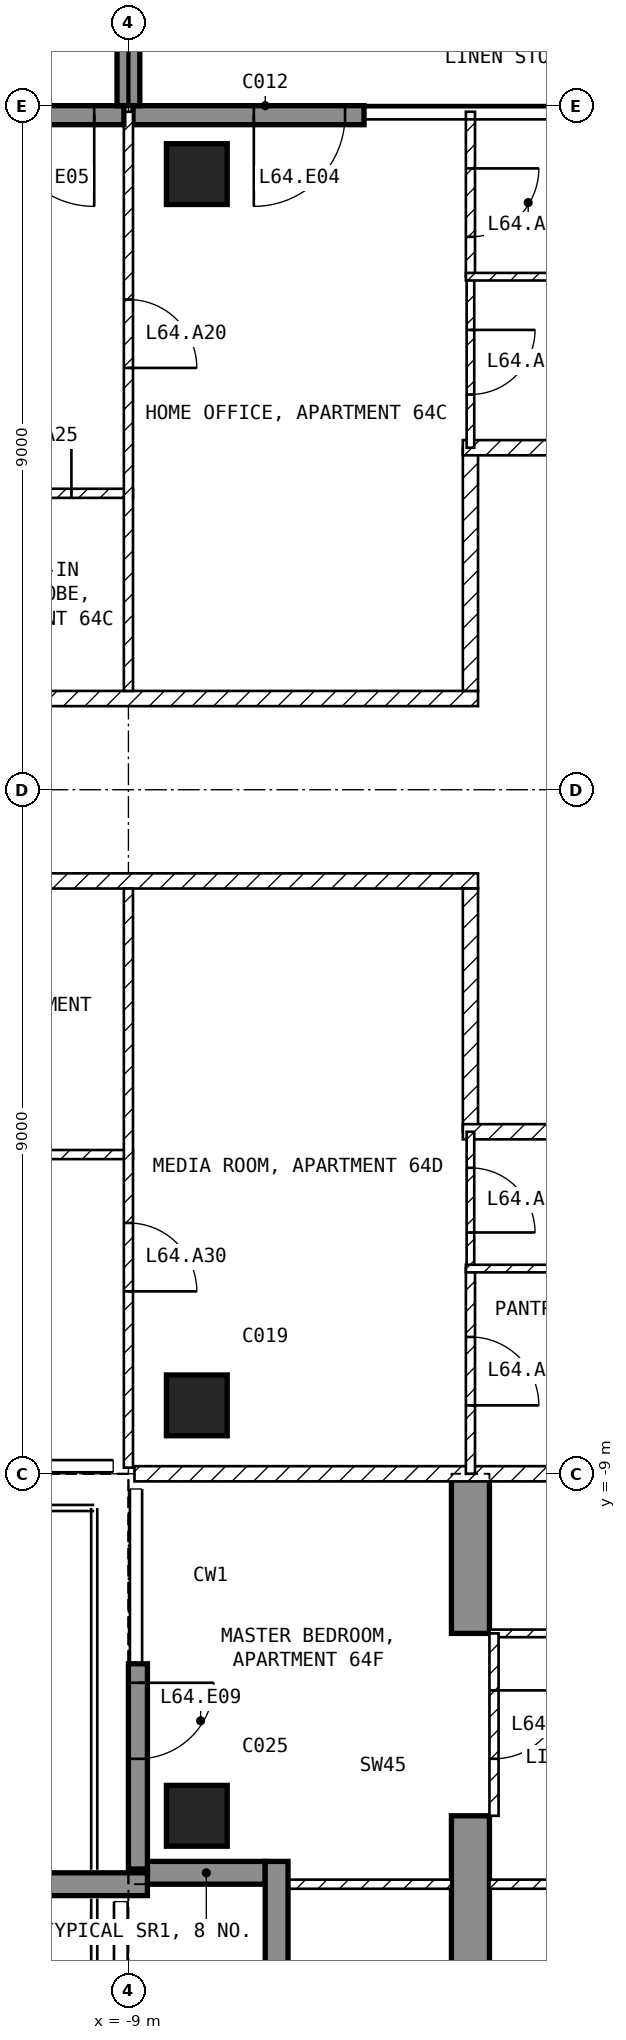
"""IFC4 building model, lengths in metres.
Left out: names, types, materials, properties, quantities, classifications, styles, units other than length and angle.
Written with IfcOpenShell. Run it as: python <this file> out.ifc"""

import sys

from ifc_helpers import new_model, si_unit, direction, frame, frame_2d, origin, origin_2d, place, context, subcontext, project, spatial, polyline, rectangle, outline, extrude, element, fill, save


model = new_model("IFC4")
c1 = context("Model", 3, precision=1e-05, world=origin(), true_north=direction((0.0, 1.0)))
c2 = subcontext(c1, "Body", "Model", "MODEL_VIEW")
j1 = project(units=[si_unit("LENGTHUNIT", "METRE"), si_unit("PLANEANGLEUNIT", "RADIAN")], contexts=[c1])
p1 = place(None, origin())
s1 = spatial("IfcSite", under=j1, at=p1, CompositionType="ELEMENT")
p2 = place(p1, origin())
s2 = spatial("IfcBuilding", under=s1, at=p2, CompositionType="ELEMENT")
p3 = place(p2, frame((0.0, 0.0, 253.5)))
s3 = spatial("IfcBuildingStorey", under=s2, at=p3, CompositionType="ELEMENT", Elevation=253.5)
for number, where, z_axis, x_axis in (
    (1, (-8.1, -13.5, -0.25), (0.0, 0.0, 1.0), (1.0, 0.0, 0.0)),
    (2, (-8.1, -8.1, -0.25), (0.0, 0.0, 1.0), (1.0, 0.0, 0.0)),
    (3, (-8.1, 8.1, -0.25), (0.0, 0.0, 1.0), (1.0, 0.0, 0.0)),
):
    element("IfcColumn", number, at=place(p3, frame(where, z_axis=z_axis, x_axis=x_axis)), inside=s3, PredefinedType="COLUMN", context=c2, shape_type="SweptSolid", body=[
        extrude(rectangle(XDim=0.8, YDim=0.8, at=origin_2d()), origin(), (0.0, 0.0, 1.0), 3.5),
    ])
p4 = place(p3, frame((-4.75, -16.7, -0.25), z_axis=(1.0, 0.0, 0.0), x_axis=(0.0, 1.0, 0.0)))
e4 = element("IfcWall", 4, at=p4, inside=s3, PredefinedType="SHEAR", context=c2, shape_type="SweptSolid", body=[
    extrude(outline(polyline([(0.0, 0.0), (3.2, 0.0), (3.2, 2.65), (5.6, 2.65), (5.6, 0.0), (7.7, 0.0), (7.7, 3.5), (0.0, 3.5), (0.0, 0.0)])), origin(), (0.0, 0.0, 1.0), 0.5),
])
p5 = place(p3, frame((-5.9, 8.875, 0.0), z_axis=(0.0, 0.0, 1.0), x_axis=(-1.0, 0.0, 0.0)))
e5 = element("IfcWall", 5, at=p5, inside=s3, PredefinedType="SOLIDWALL", context=c2, shape_type="SweptSolid", body=[
    extrude(rectangle(XDim=3.04, YDim=0.25, at=frame_2d((1.52, 0.0))), origin(), (0.0, 0.0, 1.0), 3.25),
])
p6 = place(p5, frame((0.25, 0.0, 0.0)))
e6 = element("IfcOpeningElement", 6, at=p6, cuts=e5, PredefinedType="OPENING", context=c2, shape_type="SweptSolid", body=[
    extrude(rectangle(XDim=1.2, YDim=2.4, at=frame_2d((0.6, 1.2))), frame((0.0, 0.135, 0.0), z_axis=(0.0, -1.0, 0.0), x_axis=(1.0, 0.0, 0.0)), (0.0, 0.0, 1.0), 0.27),
])
p7 = place(p3, frame((-9.06, 8.875, 0.0), z_axis=(0.0, 0.0, 1.0), x_axis=(-1.0, 0.0, 0.0)))
e7 = element("IfcWall", 7, at=p7, inside=s3, PredefinedType="SOLIDWALL", context=c2, shape_type="SweptSolid", body=[
    extrude(rectangle(XDim=1.84, YDim=0.25, at=frame_2d((0.92, 0.0))), origin(), (0.0, 0.0, 1.0), 3.25),
])
p8 = place(p7, frame((0.39, 0.0, 0.0)))
e8 = element("IfcOpeningElement", 8, at=p8, cuts=e7, PredefinedType="OPENING", context=c2, shape_type="SweptSolid", body=[
    extrude(rectangle(XDim=1.2, YDim=2.4, at=frame_2d((0.6, 1.2))), frame((0.0, 0.135, 0.0), z_axis=(0.0, -1.0, 0.0), x_axis=(1.0, 0.0, 0.0)), (0.0, 0.0, 1.0), 0.27),
])
p9 = place(p3, frame((-8.875, -11.5, 0.0), z_axis=(0.0, 0.0, 1.0), x_axis=(0.0, -1.0, 0.0)))
e9 = element("IfcWall", 9, at=p9, inside=s3, PredefinedType="SOLIDWALL", context=c2, shape_type="SweptSolid", body=[
    extrude(rectangle(XDim=2.7, YDim=0.25, at=frame_2d((1.35, 0.0))), origin(), (0.0, 0.0, 1.0), 3.25),
])
p10 = place(p9, frame((0.25, 0.0, 0.0)))
e10 = element("IfcOpeningElement", 10, at=p10, cuts=e9, PredefinedType="OPENING", context=c2, shape_type="SweptSolid", body=[
    extrude(rectangle(XDim=1.0, YDim=2.4, at=frame_2d((0.5, 1.2))), frame((0.0, 0.135, 0.0), z_axis=(0.0, -1.0, 0.0), x_axis=(1.0, 0.0, 0.0)), (0.0, 0.0, 1.0), 0.27),
])
p11 = place(p3, frame((-8.75, -14.25, 0.0), z_axis=(0.0, 0.0, 1.0), x_axis=(1.0, 0.0, 0.0)))
e11 = element("IfcWall", 11, at=p11, inside=s3, PredefinedType="SOLIDWALL", context=c2, shape_type="SweptSolid", body=[
    extrude(rectangle(XDim=1.55, YDim=0.3, at=frame_2d((0.775, 0.0))), origin(), (0.0, 0.0, 1.0), 3.25),
])
p12 = place(p3, frame((-7.05, -14.1, 0.0), z_axis=(0.0, 0.0, 1.0), x_axis=(0.0, -1.0, 0.0)))
e12 = element("IfcWall", 12, at=p12, inside=s3, PredefinedType="SOLIDWALL", context=c2, shape_type="SweptSolid", body=[
    extrude(rectangle(XDim=1.8, YDim=0.3, at=frame_2d((0.9, 0.0))), origin(), (0.0, 0.0, 1.0), 3.25),
])
p13 = place(p3, frame((-8.75, -14.4, 0.0), z_axis=(0.0, 0.0, 1.0), x_axis=(-1.0, 0.0, 0.0)))
e13 = element("IfcWall", 13, at=p13, inside=s3, PredefinedType="SOLIDWALL", context=c2, shape_type="SweptSolid", body=[
    extrude(rectangle(XDim=2.95, YDim=0.3, at=frame_2d((1.475, 0.0))), origin(), (0.0, 0.0, 1.0), 3.25),
])
p14 = place(p3, frame((-9.0, 9.0, 0.0), z_axis=(0.0, 0.0, 1.0), x_axis=(0.0, 1.0, 0.0)))
e14 = element("IfcWall", 14, at=p14, inside=s3, PredefinedType="SOLIDWALL", context=c2, shape_type="SweptSolid", body=[
    extrude(rectangle(XDim=2.7, YDim=0.3, at=frame_2d((1.35, 0.0))), origin(), (0.0, 0.0, 1.0), 3.25),
])
p15 = place(p3, frame((-21.6, 1.2, 0.0), z_axis=(0.0, 0.0, 1.0), x_axis=(1.0, 0.0, 0.0)))
e15 = element("IfcWall", 15, at=p15, inside=s3, PredefinedType="PARTITIONING", context=c2, shape_type="SweptSolid", body=[
    extrude(rectangle(XDim=17.2, YDim=0.2, at=frame_2d((8.6, 0.0))), origin(), (0.0, 0.0, 1.0), 3.25),
])
p16 = place(p15, frame((6.1, 0.0, 0.0)))
e16 = element("IfcOpeningElement", 16, at=p16, cuts=e15, PredefinedType="OPENING", context=c2, shape_type="SweptSolid", body=[
    extrude(rectangle(XDim=1.0, YDim=2.1, at=frame_2d((0.5, 1.05))), frame((0.0, 0.11, 0.0), z_axis=(0.0, -1.0, 0.0), x_axis=(1.0, 0.0, 0.0)), (0.0, 0.0, 1.0), 0.22),
])
p17 = place(p3, frame((-4.5, 1.3, 0.0), z_axis=(0.0, 0.0, 1.0), x_axis=(0.0, 1.0, 0.0)))
e17 = element("IfcWall", 17, at=p17, inside=s3, PredefinedType="PARTITIONING", context=c2, shape_type="SweptSolid", body=[
    extrude(rectangle(XDim=3.2, YDim=0.2, at=frame_2d((1.6, 0.0))), origin(), (0.0, 0.0, 1.0), 3.25),
])
p18 = place(p3, frame((-4.6, 4.5, 0.0), z_axis=(0.0, 0.0, 1.0), x_axis=(1.0, 0.0, 0.0)))
e18 = element("IfcWall", 18, at=p18, inside=s3, PredefinedType="PARTITIONING", context=c2, shape_type="SweptSolid", body=[
    extrude(rectangle(XDim=3.5, YDim=0.2, at=frame_2d((1.75, 0.0))), origin(), (0.0, 0.0, 1.0), 3.25),
])
p19 = place(p3, frame((-4.4, -1.2, 0.0), z_axis=(0.0, 0.0, 1.0), x_axis=(-1.0, 0.0, 0.0)))
e19 = element("IfcWall", 19, at=p19, inside=s3, PredefinedType="PARTITIONING", context=c2, shape_type="SweptSolid", body=[
    extrude(rectangle(XDim=17.2, YDim=0.2, at=frame_2d((8.6, 0.0))), origin(), (0.0, 0.0, 1.0), 3.25),
])
p20 = place(p19, frame((12.05, 0.0, 0.0)))
e20 = element("IfcOpeningElement", 20, at=p20, cuts=e19, PredefinedType="OPENING", context=c2, shape_type="SweptSolid", body=[
    extrude(rectangle(XDim=1.0, YDim=2.1, at=frame_2d((0.5, 1.05))), frame((0.0, 0.11, 0.0), z_axis=(0.0, -1.0, 0.0), x_axis=(1.0, 0.0, 0.0)), (0.0, 0.0, 1.0), 0.22),
])
p21 = place(p3, frame((-4.5, -4.5, 0.0), z_axis=(0.0, 0.0, 1.0), x_axis=(0.0, 1.0, 0.0)))
e21 = element("IfcWall", 21, at=p21, inside=s3, PredefinedType="PARTITIONING", context=c2, shape_type="SweptSolid", body=[
    extrude(rectangle(XDim=3.2, YDim=0.2, at=frame_2d((1.6, 0.0))), origin(), (0.0, 0.0, 1.0), 3.25),
])
p22 = place(p3, frame((-1.1, -4.5, 0.0), z_axis=(0.0, 0.0, 1.0), x_axis=(-1.0, 0.0, 0.0)))
e22 = element("IfcWall", 22, at=p22, inside=s3, PredefinedType="PARTITIONING", context=c2, shape_type="SweptSolid", body=[
    extrude(rectangle(XDim=3.5, YDim=0.2, at=frame_2d((1.75, 0.0))), origin(), (0.0, 0.0, 1.0), 3.25),
])
p23 = place(p3, frame((8.92, -9.0, 0.0), z_axis=(0.0, 0.0, 1.0), x_axis=(-1.0, 0.0, 0.0)))
e23 = element("IfcWall", 23, at=p23, inside=s3, PredefinedType="PARTITIONING", context=c2, shape_type="SweptSolid", body=[
    extrude(rectangle(XDim=17.84, YDim=0.2, at=frame_2d((8.92, 0.0))), origin(), (0.0, 0.0, 1.0), 3.25),
])
p24 = place(p23, frame((8.42, 0.0, 0.0)))
e24 = element("IfcOpeningElement", 24, at=p24, cuts=e23, PredefinedType="OPENING", context=c2, shape_type="SweptSolid", body=[
    extrude(rectangle(XDim=1.0, YDim=2.1, at=frame_2d((0.5, 1.05))), frame((0.0, 0.11, 0.0), z_axis=(0.0, -1.0, 0.0), x_axis=(1.0, 0.0, 0.0)), (0.0, 0.0, 1.0), 0.22),
])
p25 = place(p3, frame((-11.4, 3.9, 0.0), z_axis=(0.0, 0.0, 1.0), x_axis=(1.0, 0.0, 0.0)))
e25 = element("IfcWall", 25, at=p25, inside=s3, PredefinedType="PARTITIONING", context=c2, shape_type="SweptSolid", body=[
    extrude(rectangle(XDim=2.46, YDim=0.12, at=frame_2d((1.23, 0.0))), origin(), (0.0, 0.0, 1.0), 3.25),
])
p26 = place(p25, frame((0.75, 0.0, 0.0)))
e26 = element("IfcOpeningElement", 26, at=p26, cuts=e25, PredefinedType="OPENING", context=c2, shape_type="SweptSolid", body=[
    extrude(rectangle(XDim=0.9, YDim=2.1, at=frame_2d((0.45, 1.05))), frame((0.0, 0.07, 0.0), z_axis=(0.0, -1.0, 0.0), x_axis=(1.0, 0.0, 0.0)), (0.0, 0.0, 1.0), 0.14),
])
p27 = place(p3, frame((-9.0, 8.92, 0.0), z_axis=(0.0, 0.0, 1.0), x_axis=(0.0, -1.0, 0.0)))
e27 = element("IfcWall", 27, at=p27, inside=s3, PredefinedType="PARTITIONING", context=c2, shape_type="SweptSolid", body=[
    extrude(rectangle(XDim=7.62, YDim=0.12, at=frame_2d((3.81, 0.0))), origin(), (0.0, 0.0, 1.0), 3.25),
])
p28 = place(p27, frame((2.47, 0.0, 0.0)))
e28 = element("IfcOpeningElement", 28, at=p28, cuts=e27, PredefinedType="OPENING", context=c2, shape_type="SweptSolid", body=[
    extrude(rectangle(XDim=0.9, YDim=2.1, at=frame_2d((0.45, 1.05))), frame((0.0, 0.07, 0.0), z_axis=(0.0, -1.0, 0.0), x_axis=(1.0, 0.0, 0.0)), (0.0, 0.0, 1.0), 0.14),
])
p29 = place(p3, frame((-4.5, 6.75, 0.0), z_axis=(0.0, 0.0, 1.0), x_axis=(0.0, -1.0, 0.0)))
e29 = element("IfcWall", 29, at=p29, inside=s3, PredefinedType="PARTITIONING", context=c2, shape_type="SweptSolid", body=[
    extrude(rectangle(XDim=2.25, YDim=0.1, at=frame_2d((1.125, 0.0))), origin(), (0.0, 0.0, 1.0), 3.25),
])
p30 = place(p29, frame((0.7, 0.0, 0.0)))
e30 = element("IfcOpeningElement", 30, at=p30, cuts=e29, PredefinedType="OPENING", context=c2, shape_type="SweptSolid", body=[
    extrude(rectangle(XDim=0.85, YDim=2.1, at=frame_2d((0.425, 1.05))), frame((0.0, 0.06, 0.0), z_axis=(0.0, -1.0, 0.0), x_axis=(1.0, 0.0, 0.0)), (0.0, 0.0, 1.0), 0.12),
])
p31 = place(p3, frame((-4.5, 8.92, 0.0), z_axis=(0.0, 0.0, 1.0), x_axis=(0.0, -1.0, 0.0)))
e31 = element("IfcWall", 31, at=p31, inside=s3, PredefinedType="PARTITIONING", context=c2, shape_type="SweptSolid", body=[
    extrude(rectangle(XDim=2.17, YDim=0.12, at=frame_2d((1.085, 0.0))), origin(), (0.0, 0.0, 1.0), 3.25),
])
p32 = place(p31, frame((0.745, 0.0, 0.0)))
e32 = element("IfcOpeningElement", 32, at=p32, cuts=e31, PredefinedType="OPENING", context=c2, shape_type="SweptSolid", body=[
    extrude(rectangle(XDim=0.9, YDim=2.1, at=frame_2d((0.45, 1.05))), frame((0.0, 0.07, 0.0), z_axis=(0.0, -1.0, 0.0), x_axis=(1.0, 0.0, 0.0)), (0.0, 0.0, 1.0), 0.14),
])
p33 = place(p3, frame((-4.56, 6.75, 0.0), z_axis=(0.0, 0.0, 1.0), x_axis=(1.0, 0.0, 0.0)))
e33 = element("IfcWall", 33, at=p33, inside=s3, PredefinedType="PARTITIONING", context=c2, shape_type="SweptSolid", body=[
    extrude(rectangle(XDim=3.46, YDim=0.1, at=frame_2d((1.73, 0.0))), origin(), (0.0, 0.0, 1.0), 3.25),
])
p34 = place(p3, frame((-8.94, -4.8, 0.0), z_axis=(0.0, 0.0, 1.0), x_axis=(-1.0, 0.0, 0.0)))
e34 = element("IfcWall", 34, at=p34, inside=s3, PredefinedType="PARTITIONING", context=c2, shape_type="SweptSolid", body=[
    extrude(rectangle(XDim=3.51, YDim=0.12, at=frame_2d((1.755, 0.0))), origin(), (0.0, 0.0, 1.0), 3.25),
])
p35 = place(p34, frame((1.335, 0.0, 0.0)))
e35 = element("IfcOpeningElement", 35, at=p35, cuts=e34, PredefinedType="OPENING", context=c2, shape_type="SweptSolid", body=[
    extrude(rectangle(XDim=0.9, YDim=2.1, at=frame_2d((0.45, 1.05))), frame((0.0, 0.07, 0.0), z_axis=(0.0, -1.0, 0.0), x_axis=(1.0, 0.0, 0.0)), (0.0, 0.0, 1.0), 0.14),
])
p36 = place(p3, frame((-9.0, -1.3, 0.0), z_axis=(0.0, 0.0, 1.0), x_axis=(0.0, -1.0, 0.0)))
e36 = element("IfcWall", 36, at=p36, inside=s3, PredefinedType="PARTITIONING", context=c2, shape_type="SweptSolid", body=[
    extrude(rectangle(XDim=7.62, YDim=0.12, at=frame_2d((3.81, 0.0))), origin(), (0.0, 0.0, 1.0), 3.25),
])
p37 = place(p36, frame((4.4, 0.0, 0.0)))
e37 = element("IfcOpeningElement", 37, at=p37, cuts=e36, PredefinedType="OPENING", context=c2, shape_type="SweptSolid", body=[
    extrude(rectangle(XDim=0.9, YDim=2.1, at=frame_2d((0.45, 1.05))), frame((0.0, 0.07, 0.0), z_axis=(0.0, -1.0, 0.0), x_axis=(1.0, 0.0, 0.0)), (0.0, 0.0, 1.0), 0.14),
])
p38 = place(p3, frame((-4.5, -4.5, 0.0), z_axis=(0.0, 0.0, 1.0), x_axis=(0.0, -1.0, 0.0)))
e38 = element("IfcWall", 38, at=p38, inside=s3, PredefinedType="PARTITIONING", context=c2, shape_type="SweptSolid", body=[
    extrude(rectangle(XDim=1.8, YDim=0.1, at=frame_2d((0.9, 0.0))), origin(), (0.0, 0.0, 1.0), 3.25),
])
p39 = place(p38, frame((0.475, 0.0, 0.0)))
e39 = element("IfcOpeningElement", 39, at=p39, cuts=e38, PredefinedType="OPENING", context=c2, shape_type="SweptSolid", body=[
    extrude(rectangle(XDim=0.85, YDim=2.1, at=frame_2d((0.425, 1.05))), frame((0.0, 0.06, 0.0), z_axis=(0.0, -1.0, 0.0), x_axis=(1.0, 0.0, 0.0)), (0.0, 0.0, 1.0), 0.12),
])
p40 = place(p3, frame((-4.5, -6.3, 0.0), z_axis=(0.0, 0.0, 1.0), x_axis=(0.0, -1.0, 0.0)))
e40 = element("IfcWall", 40, at=p40, inside=s3, PredefinedType="PARTITIONING", context=c2, shape_type="SweptSolid", body=[
    extrude(rectangle(XDim=2.7, YDim=0.12, at=frame_2d((1.35, 0.0))), origin(), (0.0, 0.0, 1.0), 3.25),
])
p41 = place(p40, frame((0.9, 0.0, 0.0)))
e41 = element("IfcOpeningElement", 41, at=p41, cuts=e40, PredefinedType="OPENING", context=c2, shape_type="SweptSolid", body=[
    extrude(rectangle(XDim=0.9, YDim=2.1, at=frame_2d((0.45, 1.05))), frame((0.0, 0.07, 0.0), z_axis=(0.0, -1.0, 0.0), x_axis=(1.0, 0.0, 0.0)), (0.0, 0.0, 1.0), 0.14),
])
p42 = place(p3, frame((-1.1, -6.3, 0.0), z_axis=(0.0, 0.0, 1.0), x_axis=(-1.0, 0.0, 0.0)))
e42 = element("IfcWall", 42, at=p42, inside=s3, PredefinedType="PARTITIONING", context=c2, shape_type="SweptSolid", body=[
    extrude(rectangle(XDim=3.46, YDim=0.1, at=frame_2d((1.73, 0.0))), origin(), (0.0, 0.0, 1.0), 3.25),
])
p43 = place(p3, frame((-2.1, -11.1, 0.0), z_axis=(0.0, 0.0, 1.0), x_axis=(-1.0, 0.0, 0.0)))
e43 = element("IfcWall", 43, at=p43, inside=s3, PredefinedType="PARTITIONING", context=c2, shape_type="SweptSolid", body=[
    extrude(rectangle(XDim=2.15, YDim=0.1, at=frame_2d((1.075, 0.0))), origin(), (0.0, 0.0, 1.0), 3.25),
])
p44 = place(p3, frame((4.25, -14.4, 0.0), z_axis=(0.0, 0.0, 1.0), x_axis=(-1.0, 0.0, 0.0)))
e44 = element("IfcWall", 44, at=p44, inside=s3, PredefinedType="PARTITIONING", context=c2, shape_type="SweptSolid", body=[
    extrude(rectangle(XDim=8.5, YDim=0.12, at=frame_2d((4.25, 0.0))), origin(), (0.0, 0.0, 1.0), 3.25),
])
p45 = place(p44, frame((5.675, 0.0, 0.0)))
e45 = element("IfcOpeningElement", 45, at=p45, cuts=e44, PredefinedType="OPENING", context=c2, shape_type="SweptSolid", body=[
    extrude(rectangle(XDim=0.9, YDim=2.1, at=frame_2d((0.45, 1.05))), frame((0.0, 0.07, 0.0), z_axis=(0.0, -1.0, 0.0), x_axis=(1.0, 0.0, 0.0)), (0.0, 0.0, 1.0), 0.14),
])
p46 = place(p3, frame((-4.75, -14.4, 0.0), z_axis=(0.0, 0.0, 1.0), x_axis=(-1.0, 0.0, 0.0)))
e46 = element("IfcWall", 46, at=p46, inside=s3, PredefinedType="PARTITIONING", context=c2, shape_type="SweptSolid", body=[
    extrude(rectangle(XDim=2.37, YDim=0.12, at=frame_2d((1.185, 0.0))), origin(), (0.0, 0.0, 1.0), 3.25),
])
p47 = place(p3, frame((-4.19, -11.1, 0.0), z_axis=(0.0, 0.0, 1.0), x_axis=(0.0, -1.0, 0.0)))
e47 = element("IfcWall", 47, at=p47, inside=s3, PredefinedType="PARTITIONING", context=c2, shape_type="SweptSolid", body=[
    extrude(rectangle(XDim=2.4, YDim=0.12, at=frame_2d((1.2, 0.0))), origin(), (0.0, 0.0, 1.0), 2.4),
])
p48 = place(p47, frame((0.75, 0.0, 0.0)))
e48 = element("IfcOpeningElement", 48, at=p48, cuts=e47, PredefinedType="OPENING", context=c2, shape_type="SweptSolid", body=[
    extrude(rectangle(XDim=0.9, YDim=2.1, at=frame_2d((0.45, 1.05))), frame((0.0, 0.07, 0.0), z_axis=(0.0, -1.0, 0.0), x_axis=(1.0, 0.0, 0.0)), (0.0, 0.0, 1.0), 0.14),
])
p49 = place(p6, origin())
e49 = element("IfcDoor", 49, at=p49, inside=s3, OperationType="SINGLE_SWING_RIGHT", PredefinedType="DOOR", context=c2, shape_type="SweptSolid", body=[
    extrude(rectangle(XDim=1.2, YDim=2.4, at=frame_2d((0.6, 1.2))), frame((0.0, 0.025, 0.0), z_axis=(0.0, -1.0, 0.0), x_axis=(1.0, 0.0, 0.0)), (0.0, 0.0, 1.0), 0.05),
])
fill(e6, e49)
p50 = place(p8, origin())
e50 = element("IfcDoor", 50, at=p50, inside=s3, OperationType="SINGLE_SWING_LEFT", PredefinedType="DOOR", context=c2, shape_type="SweptSolid", body=[
    extrude(rectangle(XDim=1.2, YDim=2.4, at=frame_2d((0.6, 1.2))), frame((0.0, 0.025, 0.0), z_axis=(0.0, -1.0, 0.0), x_axis=(1.0, 0.0, 0.0)), (0.0, 0.0, 1.0), 0.05),
])
fill(e8, e50)
p51 = place(p10, origin())
e51 = element("IfcDoor", 51, at=p51, inside=s3, OperationType="SINGLE_SWING_LEFT", PredefinedType="DOOR", context=c2, shape_type="SweptSolid", body=[
    extrude(rectangle(XDim=1.0, YDim=2.4, at=frame_2d((0.5, 1.2))), frame((0.0, 0.025, 0.0), z_axis=(0.0, -1.0, 0.0), x_axis=(1.0, 0.0, 0.0)), (0.0, 0.0, 1.0), 0.05),
])
fill(e10, e51)
p52 = place(p30, origin())
e52 = element("IfcDoor", 52, at=p52, inside=s3, OperationType="SINGLE_SWING_LEFT", PredefinedType="DOOR", context=c2, shape_type="SweptSolid", body=[
    extrude(rectangle(XDim=0.85, YDim=2.1, at=frame_2d((0.425, 1.05))), frame((0.0, 0.025, 0.0), z_axis=(0.0, -1.0, 0.0), x_axis=(1.0, 0.0, 0.0)), (0.0, 0.0, 1.0), 0.05),
])
fill(e30, e52)
p53 = place(p28, origin())
e53 = element("IfcDoor", 53, at=p53, inside=s3, OperationType="SINGLE_SWING_RIGHT", PredefinedType="DOOR", context=c2, shape_type="SweptSolid", body=[
    extrude(rectangle(XDim=0.9, YDim=2.1, at=frame_2d((0.45, 1.05))), frame((0.0, 0.025, 0.0), z_axis=(0.0, -1.0, 0.0), x_axis=(1.0, 0.0, 0.0)), (0.0, 0.0, 1.0), 0.05),
])
fill(e28, e53)
p54 = place(p32, origin())
e54 = element("IfcDoor", 54, at=p54, inside=s3, OperationType="SINGLE_SWING_LEFT", PredefinedType="DOOR", context=c2, shape_type="SweptSolid", body=[
    extrude(rectangle(XDim=0.9, YDim=2.1, at=frame_2d((0.45, 1.05))), frame((0.0, 0.025, 0.0), z_axis=(0.0, -1.0, 0.0), x_axis=(1.0, 0.0, 0.0)), (0.0, 0.0, 1.0), 0.05),
])
fill(e32, e54)
p55 = place(p26, origin())
e55 = element("IfcDoor", 55, at=p55, inside=s3, OperationType="SINGLE_SWING_RIGHT", PredefinedType="DOOR", context=c2, shape_type="SweptSolid", body=[
    extrude(rectangle(XDim=0.9, YDim=2.1, at=frame_2d((0.45, 1.05))), frame((0.0, 0.025, 0.0), z_axis=(0.0, -1.0, 0.0), x_axis=(1.0, 0.0, 0.0)), (0.0, 0.0, 1.0), 0.05),
])
fill(e26, e55)
p56 = place(p37, origin())
e56 = element("IfcDoor", 56, at=p56, inside=s3, OperationType="SINGLE_SWING_RIGHT", PredefinedType="DOOR", context=c2, shape_type="SweptSolid", body=[
    extrude(rectangle(XDim=0.9, YDim=2.1, at=frame_2d((0.45, 1.05))), frame((0.0, 0.025, 0.0), z_axis=(0.0, -1.0, 0.0), x_axis=(1.0, 0.0, 0.0)), (0.0, 0.0, 1.0), 0.05),
])
fill(e37, e56)
p57 = place(p41, origin())
e57 = element("IfcDoor", 57, at=p57, inside=s3, OperationType="SINGLE_SWING_RIGHT", PredefinedType="DOOR", context=c2, shape_type="SweptSolid", body=[
    extrude(rectangle(XDim=0.9, YDim=2.1, at=frame_2d((0.45, 1.05))), frame((0.0, 0.025, 0.0), z_axis=(0.0, -1.0, 0.0), x_axis=(1.0, 0.0, 0.0)), (0.0, 0.0, 1.0), 0.05),
])
fill(e41, e57)
p58 = place(p39, origin())
e58 = element("IfcDoor", 58, at=p58, inside=s3, OperationType="SINGLE_SWING_RIGHT", PredefinedType="DOOR", context=c2, shape_type="SweptSolid", body=[
    extrude(rectangle(XDim=0.85, YDim=2.1, at=frame_2d((0.425, 1.05))), frame((0.0, 0.025, 0.0), z_axis=(0.0, -1.0, 0.0), x_axis=(1.0, 0.0, 0.0)), (0.0, 0.0, 1.0), 0.05),
])
fill(e39, e58)
p59 = place(p48, origin())
e59 = element("IfcDoor", 59, at=p59, inside=s3, OperationType="SINGLE_SWING_LEFT", PredefinedType="DOOR", context=c2, shape_type="SweptSolid", body=[
    extrude(rectangle(XDim=0.9, YDim=2.1, at=frame_2d((0.45, 1.05))), frame((0.0, 0.025, 0.0), z_axis=(0.0, -1.0, 0.0), x_axis=(1.0, 0.0, 0.0)), (0.0, 0.0, 1.0), 0.05),
])
fill(e48, e59)
save(model, sys.argv[1])
